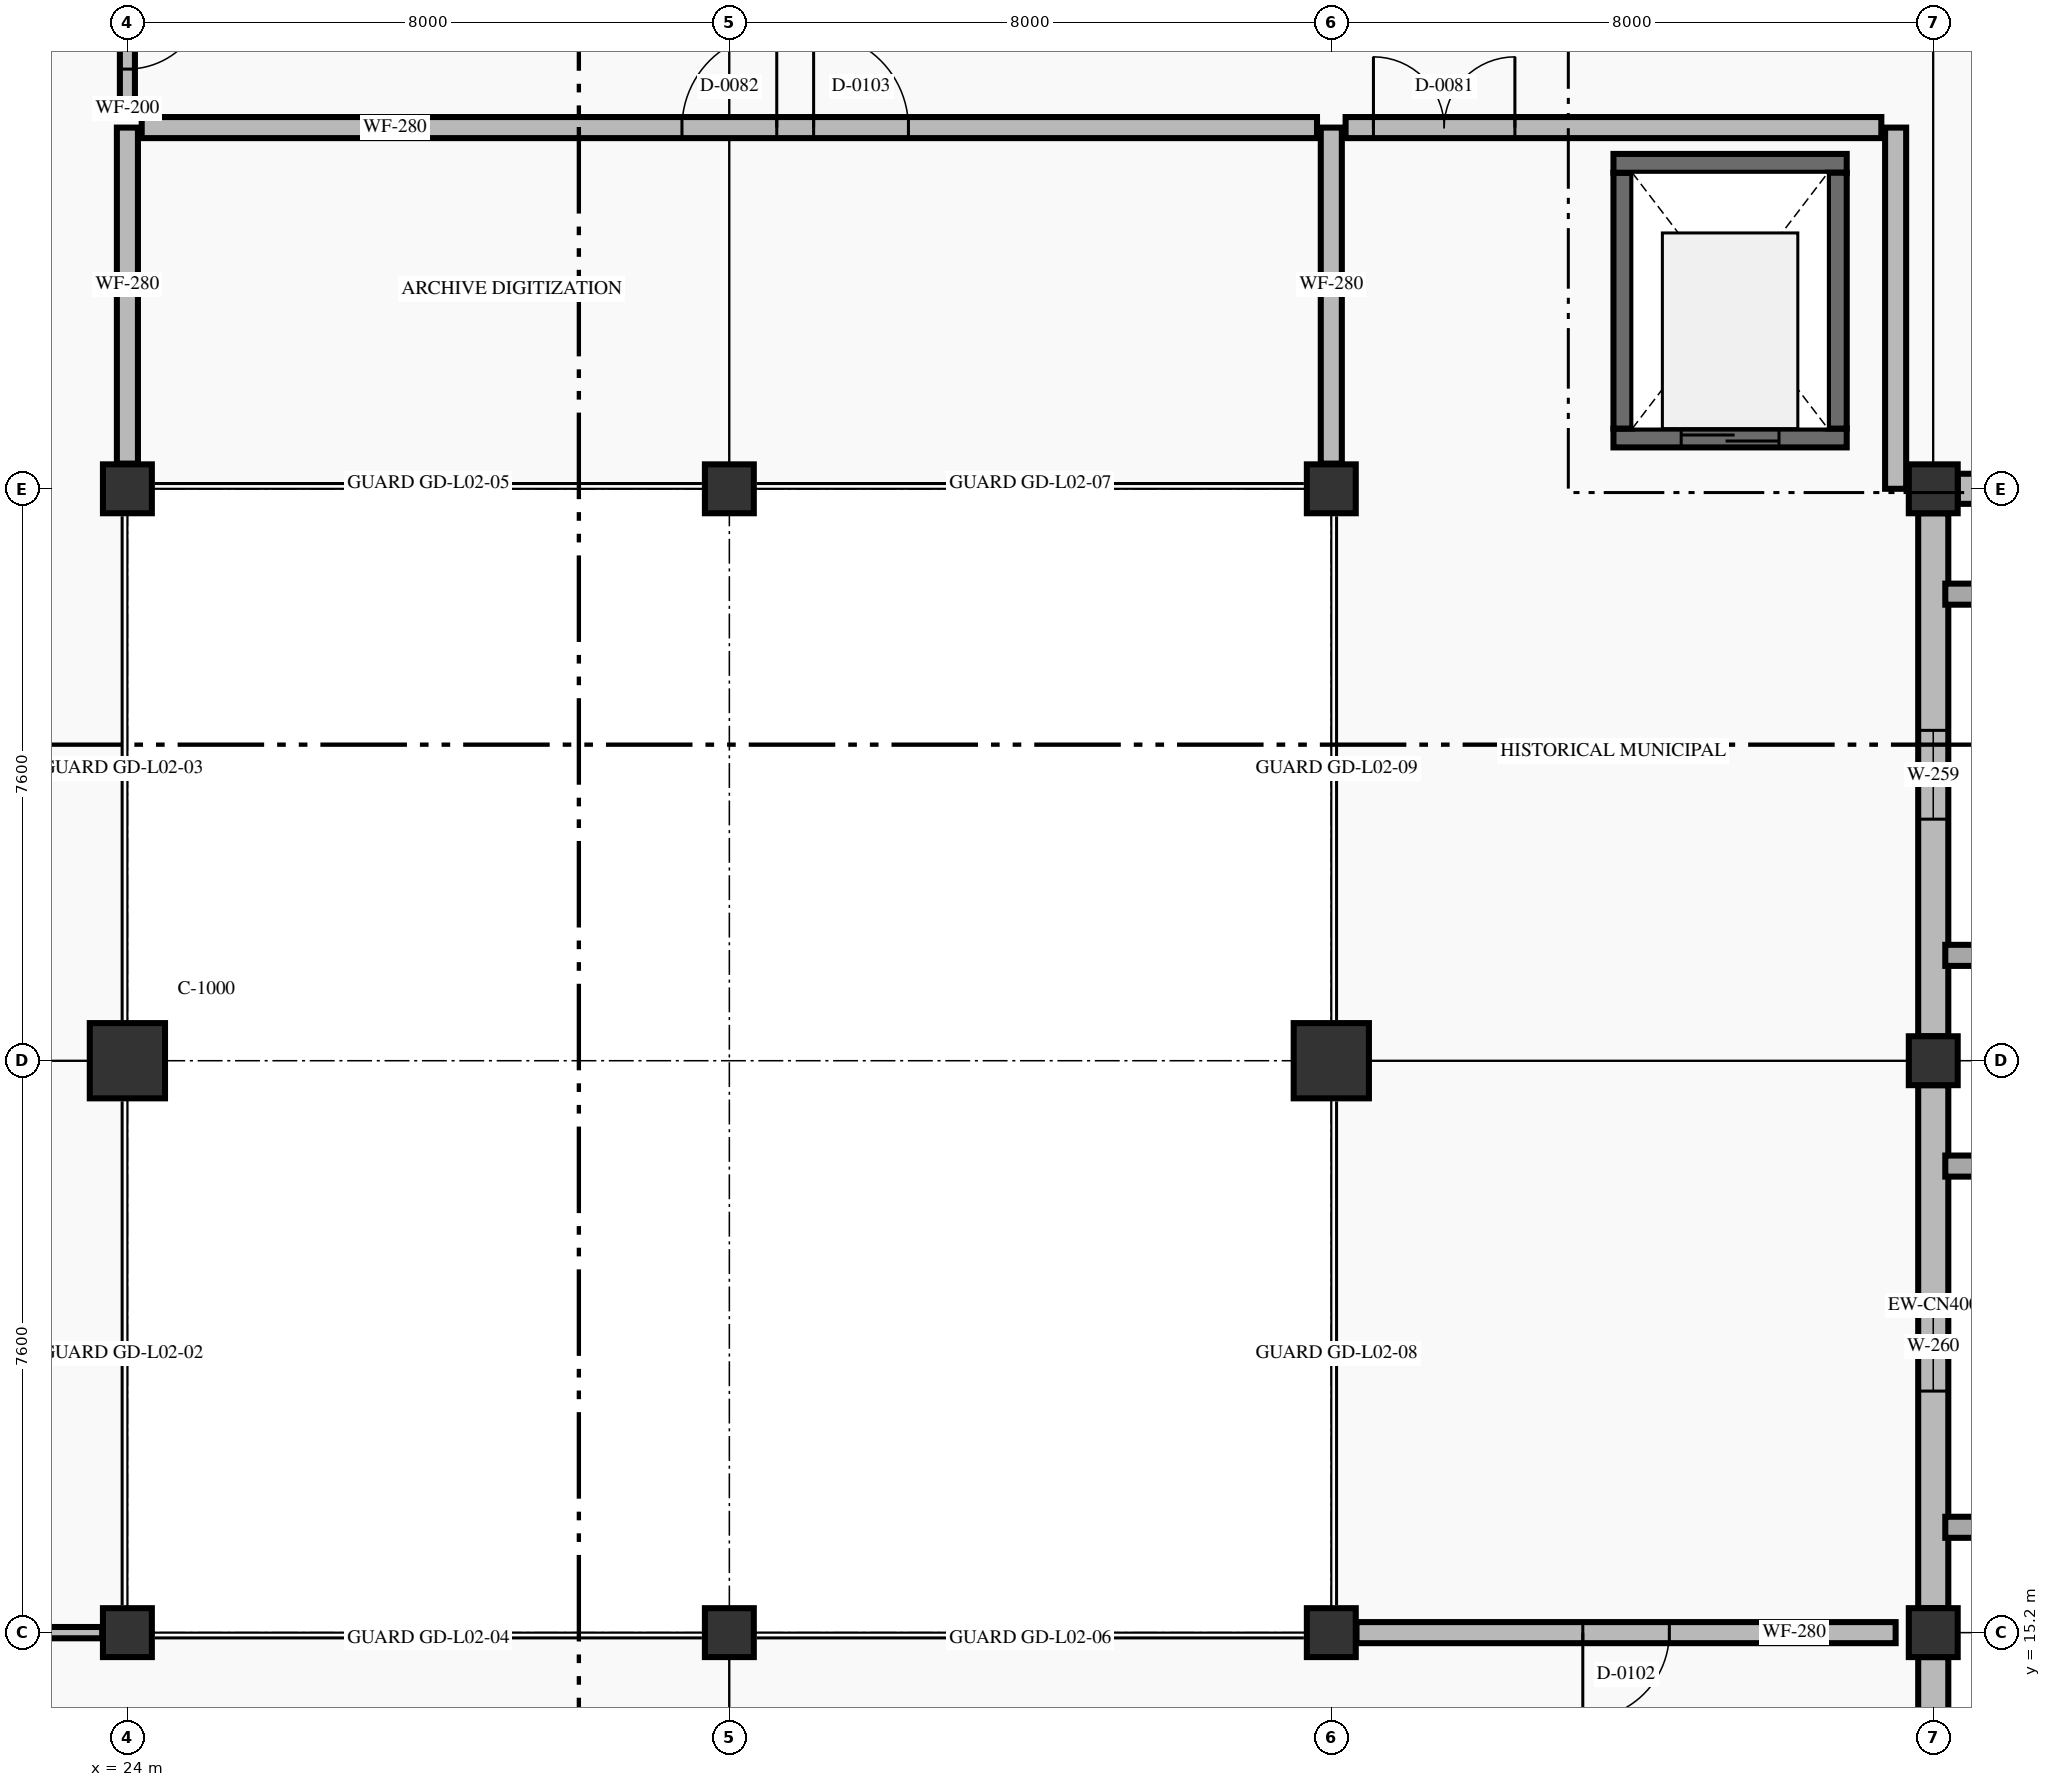
"""IFC4 building model, lengths in metres.
Left out: names, types, materials, properties, quantities, classifications, styles, units other than length and angle.
Written with IfcOpenShell. Run it as: python <this file> out.ifc"""

import sys

from ifc_helpers import new_model, si_unit, direction, frame, frame_2d, origin, origin_2d, place, context, subcontext, project, spatial, rectangle, extrude, element, fill, save


model = new_model("IFC4")
c1 = context("Model", 3, precision=1e-05, world=origin(), true_north=direction((0.0, 1.0)))
c2 = subcontext(c1, "Body", "Model", "MODEL_VIEW")
j1 = project(units=[si_unit("LENGTHUNIT", "METRE"), si_unit("PLANEANGLEUNIT", "RADIAN")], contexts=[c1])
p1 = place(None, origin())
s1 = spatial("IfcSite", under=j1, at=p1, CompositionType="ELEMENT")
p2 = place(p1, origin())
s2 = spatial("IfcBuilding", under=s1, at=p2, CompositionType="ELEMENT")
p3 = place(p2, frame((0.0, 0.0, 5.4)))
s3 = spatial("IfcBuildingStorey", under=s2, at=p3, CompositionType="ELEMENT", Elevation=5.4)
p4 = place(p3, frame((24.0, 15.2, 0.0), z_axis=(0.0, 0.0, 1.0), x_axis=(1.0, 0.0, 0.0)))
e1 = element("IfcColumn", 1, at=p4, inside=s3, PredefinedType="COLUMN", context=c2, shape_type="SweptSolid", body=[
    extrude(rectangle(XDim=0.65, YDim=0.65, at=origin_2d()), origin(), (0.0, 0.0, 1.0), 4.8),
])
p5 = place(p3, frame((24.0, 22.8, 0.0), z_axis=(0.0, 0.0, 1.0), x_axis=(1.0, 0.0, 0.0)))
e2 = element("IfcColumn", 2, at=p5, inside=s3, PredefinedType="COLUMN", context=c2, shape_type="SweptSolid", body=[
    extrude(rectangle(XDim=1.0, YDim=1.0, at=origin_2d()), origin(), (0.0, 0.0, 1.0), 4.8),
])
for number, where, z_axis, x_axis in (
    (3, (24.0, 30.4, 0.0), (0.0, 0.0, 1.0), (1.0, 0.0, 0.0)),
    (4, (32.0, 15.2, 0.0), (0.0, 0.0, 1.0), (1.0, 0.0, 0.0)),
    (5, (32.0, 30.4, 0.0), (0.0, 0.0, 1.0), (1.0, 0.0, 0.0)),
    (6, (40.0, 15.2, 0.0), (0.0, 0.0, 1.0), (1.0, 0.0, 0.0)),
):
    element("IfcColumn", number, at=place(p3, frame(where, z_axis=z_axis, x_axis=x_axis)), inside=s3, PredefinedType="COLUMN", context=c2, shape_type="SweptSolid", body=[
        extrude(rectangle(XDim=0.65, YDim=0.65, at=origin_2d()), origin(), (0.0, 0.0, 1.0), 4.8),
    ])
p6 = place(p3, frame((40.0, 22.8, 0.0), z_axis=(0.0, 0.0, 1.0), x_axis=(1.0, 0.0, 0.0)))
e7 = element("IfcColumn", 7, at=p6, inside=s3, PredefinedType="COLUMN", context=c2, shape_type="SweptSolid", body=[
    extrude(rectangle(XDim=1.0, YDim=1.0, at=origin_2d()), origin(), (0.0, 0.0, 1.0), 4.8),
])
for number, where, z_axis, x_axis in (
    (8, (40.0, 30.4, 0.0), (0.0, 0.0, 1.0), (1.0, 0.0, 0.0)),
    (9, (48.0, 15.2, 0.0), (0.0, 0.0, 1.0), (1.0, 0.0, 0.0)),
    (10, (48.0, 22.8, 0.0), (0.0, 0.0, 1.0), (1.0, 0.0, 0.0)),
    (11, (48.0, 30.4, 0.0), (0.0, 0.0, 1.0), (1.0, 0.0, 0.0)),
):
    element("IfcColumn", number, at=place(p3, frame(where, z_axis=z_axis, x_axis=x_axis)), inside=s3, PredefinedType="COLUMN", context=c2, shape_type="SweptSolid", body=[
        extrude(rectangle(XDim=0.65, YDim=0.65, at=origin_2d()), origin(), (0.0, 0.0, 1.0), 4.8),
    ])
p7 = place(p3, frame((55.6, 30.4, 0.0), z_axis=(0.0, 0.0, 1.0), x_axis=(-1.0, 0.0, 0.0)))
e12 = element("IfcWall", 12, at=p7, inside=s3, PredefinedType="STANDARD", context=c2, shape_type="SweptSolid", body=[
    extrude(rectangle(XDim=7.275, YDim=0.4, at=frame_2d((3.638, 0.0))), origin(), (0.0, 0.0, 1.0), 3.94),
])
p8 = place(p7, frame((1.019, 0.0, 0.9)))
e13 = element("IfcOpeningElement", 13, at=p8, cuts=e12, PredefinedType="OPENING", context=c2, shape_type="SweptSolid", body=[
    extrude(rectangle(XDim=1.6, YDim=2.25, at=frame_2d((0.8, 1.125))), frame((0.0, 0.21, 0.0), z_axis=(0.0, -1.0, 0.0), x_axis=(1.0, 0.0, 0.0)), (0.0, 0.0, 1.0), 0.42),
])
p9 = place(p7, frame((4.656, 0.0, 0.9)))
e14 = element("IfcOpeningElement", 14, at=p9, cuts=e12, PredefinedType="OPENING", context=c2, shape_type="SweptSolid", body=[
    extrude(rectangle(XDim=1.6, YDim=2.25, at=frame_2d((0.8, 1.125))), frame((0.0, 0.21, 0.0), z_axis=(0.0, -1.0, 0.0), x_axis=(1.0, 0.0, 0.0)), (0.0, 0.0, 1.0), 0.42),
])
p10 = place(p3, frame((48.0, 30.075, 0.0), z_axis=(0.0, 0.0, 1.0), x_axis=(0.0, -1.0, 0.0)))
e15 = element("IfcWall", 15, at=p10, inside=s3, PredefinedType="STANDARD", context=c2, shape_type="SweptSolid", body=[
    extrude(rectangle(XDim=6.95, YDim=0.4, at=frame_2d((3.475, 0.0))), origin(), (0.0, 0.0, 1.0), 3.84),
])
p11 = place(p10, frame((2.885, 0.0, 2.4)))
e16 = element("IfcOpeningElement", 16, at=p11, cuts=e15, PredefinedType="OPENING", context=c2, shape_type="SweptSolid", body=[
    extrude(rectangle(XDim=1.18, YDim=0.92, at=frame_2d((0.59, 0.46))), frame((0.0, 0.21, 0.0), z_axis=(0.0, -1.0, 0.0), x_axis=(1.0, 0.0, 0.0)), (0.0, 0.0, 1.0), 0.42),
])
p12 = place(p3, frame((48.0, 22.475, 0.0), z_axis=(0.0, 0.0, 1.0), x_axis=(0.0, -1.0, 0.0)))
e17 = element("IfcWall", 17, at=p12, inside=s3, PredefinedType="STANDARD", context=c2, shape_type="SweptSolid", body=[
    extrude(rectangle(XDim=6.95, YDim=0.4, at=frame_2d((3.475, 0.0))), origin(), (0.0, 0.0, 1.0), 3.84),
])
p13 = place(p12, frame((2.885, 0.0, 2.4)))
e18 = element("IfcOpeningElement", 18, at=p13, cuts=e17, PredefinedType="OPENING", context=c2, shape_type="SweptSolid", body=[
    extrude(rectangle(XDim=1.18, YDim=0.92, at=frame_2d((0.59, 0.46))), frame((0.0, 0.21, 0.0), z_axis=(0.0, -1.0, 0.0), x_axis=(1.0, 0.0, 0.0)), (0.0, 0.0, 1.0), 0.42),
])
p14 = place(p3, frame((48.0, 14.875, 0.0), z_axis=(0.0, 0.0, 1.0), x_axis=(0.0, -1.0, 0.0)))
e19 = element("IfcWall", 19, at=p14, inside=s3, PredefinedType="STANDARD", context=c2, shape_type="SweptSolid", body=[
    extrude(rectangle(XDim=6.95, YDim=0.4, at=frame_2d((3.475, 0.0))), origin(), (0.0, 0.0, 1.0), 3.84),
])
p15 = place(p14, frame((0.988, 0.0, 0.9)))
e20 = element("IfcOpeningElement", 20, at=p15, cuts=e19, PredefinedType="OPENING", context=c2, shape_type="SweptSolid", body=[
    extrude(rectangle(XDim=1.5, YDim=2.15, at=frame_2d((0.75, 1.075))), frame((0.0, 0.21, 0.0), z_axis=(0.0, -1.0, 0.0), x_axis=(1.0, 0.0, 0.0)), (0.0, 0.0, 1.0), 0.42),
])
p16 = place(p14, frame((4.462, 0.0, 0.9)))
e21 = element("IfcOpeningElement", 21, at=p16, cuts=e19, PredefinedType="OPENING", context=c2, shape_type="SweptSolid", body=[
    extrude(rectangle(XDim=1.5, YDim=2.15, at=frame_2d((0.75, 1.075))), frame((0.0, 0.21, 0.0), z_axis=(0.0, -1.0, 0.0), x_axis=(1.0, 0.0, 0.0)), (0.0, 0.0, 1.0), 0.42),
])
p17 = place(p3, frame((46.85, 31.075, 0.0), z_axis=(0.0, 0.0, 1.0), x_axis=(-1.0, 0.0, 0.0)))
e22 = element("IfcWall", 22, at=p17, inside=s3, PredefinedType="SHEAR", context=c2, shape_type="SweptSolid", body=[
    extrude(rectangle(XDim=3.1, YDim=0.25, at=frame_2d((1.55, 0.0))), origin(), (0.0, 0.0, 1.0), 4.8),
])
p18 = place(p17, frame((0.9, 0.0, 0.0)))
e23 = element("IfcOpeningElement", 23, at=p18, cuts=e22, PredefinedType="OPENING", context=c2, shape_type="SweptSolid", body=[
    extrude(rectangle(XDim=1.3, YDim=2.25, at=frame_2d((0.65, 1.125))), frame((0.0, 0.135, 0.0), z_axis=(0.0, -1.0, 0.0), x_axis=(1.0, 0.0, 0.0)), (0.0, 0.0, 1.0), 0.27),
])
p19 = place(p3, frame((43.875, 31.2, 0.0), z_axis=(0.0, 0.0, 1.0), x_axis=(0.0, 1.0, 0.0)))
e24 = element("IfcWall", 24, at=p19, inside=s3, PredefinedType="SHEAR", context=c2, shape_type="SweptSolid", body=[
    extrude(rectangle(XDim=3.4, YDim=0.25, at=frame_2d((1.7, 0.0))), origin(), (0.0, 0.0, 1.0), 4.8),
])
p20 = place(p3, frame((43.75, 34.725, 0.0), z_axis=(0.0, 0.0, 1.0), x_axis=(1.0, 0.0, 0.0)))
e25 = element("IfcWall", 25, at=p20, inside=s3, PredefinedType="SHEAR", context=c2, shape_type="SweptSolid", body=[
    extrude(rectangle(XDim=3.1, YDim=0.25, at=frame_2d((1.55, 0.0))), origin(), (0.0, 0.0, 1.0), 4.8),
])
p21 = place(p3, frame((46.725, 34.6, 0.0), z_axis=(0.0, 0.0, 1.0), x_axis=(0.0, -1.0, 0.0)))
e26 = element("IfcWall", 26, at=p21, inside=s3, PredefinedType="SHEAR", context=c2, shape_type="SweptSolid", body=[
    extrude(rectangle(XDim=3.4, YDim=0.25, at=frame_2d((1.7, 0.0))), origin(), (0.0, 0.0, 1.0), 4.8),
])
p22 = place(p3, frame((40.0, 30.735, 0.0), z_axis=(0.0, 0.0, 1.0), x_axis=(0.0, 1.0, 0.0)))
e27 = element("IfcWall", 27, at=p22, inside=s3, PredefinedType="STANDARD", context=c2, shape_type="SweptSolid", body=[
    extrude(rectangle(XDim=4.465, YDim=0.28, at=frame_2d((2.232, 0.0))), origin(), (0.0, 0.0, 1.0), 4.54),
])
p23 = place(p3, frame((47.5, 15.2, 0.0), z_axis=(0.0, 0.0, 1.0), x_axis=(-1.0, 0.0, 0.0)))
e28 = element("IfcWall", 28, at=p23, inside=s3, PredefinedType="STANDARD", context=c2, shape_type="SweptSolid", body=[
    extrude(rectangle(XDim=7.165, YDim=0.28, at=frame_2d((3.583, 0.0))), origin(), (0.0, 0.0, 1.0), 3.89),
])
p24 = place(p23, frame((3.008, 0.0, 0.0)))
e29 = element("IfcOpeningElement", 29, at=p24, cuts=e28, PredefinedType="OPENING", context=c2, shape_type="SweptSolid", body=[
    extrude(rectangle(XDim=1.15, YDim=2.2, at=frame_2d((0.575, 1.1))), frame((0.0, 0.15, 0.0), z_axis=(0.0, -1.0, 0.0), x_axis=(1.0, 0.0, 0.0)), (0.0, 0.0, 1.0), 0.3),
])
p25 = place(p3, frame((47.5, 35.2, 0.0), z_axis=(0.0, 0.0, 1.0), x_axis=(0.0, -1.0, 0.0)))
e30 = element("IfcWall", 30, at=p25, inside=s3, PredefinedType="STANDARD", context=c2, shape_type="SweptSolid", body=[
    extrude(rectangle(XDim=4.8, YDim=0.28, at=frame_2d((2.4, 0.0))), origin(), (0.0, 0.0, 1.0), 4.54),
])
p26 = place(p3, frame((40.19, 35.2, 0.0), z_axis=(0.0, 0.0, 1.0), x_axis=(1.0, 0.0, 0.0)))
e31 = element("IfcWall", 31, at=p26, inside=s3, PredefinedType="STANDARD", context=c2, shape_type="SweptSolid", body=[
    extrude(rectangle(XDim=7.12, YDim=0.28, at=frame_2d((3.56, 0.0))), origin(), (0.0, 0.0, 1.0), 4.54),
])
p27 = place(p26, frame((0.37, 0.0, 0.0)))
e32 = element("IfcOpeningElement", 32, at=p27, cuts=e31, PredefinedType="OPENING", context=c2, shape_type="SweptSolid", body=[
    extrude(rectangle(XDim=1.88, YDim=2.36, at=frame_2d((0.94, 1.18))), frame((0.0, 0.15, 0.0), z_axis=(0.0, -1.0, 0.0), x_axis=(1.0, 0.0, 0.0)), (0.0, 0.0, 1.0), 0.3),
])
p28 = place(p3, frame((24.0, 30.735, 0.0), z_axis=(0.0, 0.0, 1.0), x_axis=(0.0, 1.0, 0.0)))
e33 = element("IfcWall", 33, at=p28, inside=s3, PredefinedType="STANDARD", context=c2, shape_type="SweptSolid", body=[
    extrude(rectangle(XDim=4.465, YDim=0.28, at=frame_2d((2.232, 0.0))), origin(), (0.0, 0.0, 1.0), 4.54),
])
p29 = place(p3, frame((24.19, 35.2, 0.0), z_axis=(0.0, 0.0, 1.0), x_axis=(1.0, 0.0, 0.0)))
e34 = element("IfcWall", 34, at=p29, inside=s3, PredefinedType="STANDARD", context=c2, shape_type="SweptSolid", body=[
    extrude(rectangle(XDim=15.62, YDim=0.28, at=frame_2d((7.81, 0.0))), origin(), (0.0, 0.0, 1.0), 4.54),
])
p30 = place(p29, frame((7.18, 0.0, 0.0)))
e35 = element("IfcOpeningElement", 35, at=p30, cuts=e34, PredefinedType="OPENING", context=c2, shape_type="SweptSolid", body=[
    extrude(rectangle(XDim=1.26, YDim=2.26, at=frame_2d((0.63, 1.13))), frame((0.0, 0.15, 0.0), z_axis=(0.0, -1.0, 0.0), x_axis=(1.0, 0.0, 0.0)), (0.0, 0.0, 1.0), 0.3),
])
p31 = place(p29, frame((8.93, 0.0, 0.0)))
e36 = element("IfcOpeningElement", 36, at=p31, cuts=e34, PredefinedType="OPENING", context=c2, shape_type="SweptSolid", body=[
    extrude(rectangle(XDim=1.26, YDim=2.26, at=frame_2d((0.63, 1.13))), frame((0.0, 0.15, 0.0), z_axis=(0.0, -1.0, 0.0), x_axis=(1.0, 0.0, 0.0)), (0.0, 0.0, 1.0), 0.3),
])
p32 = place(p3, frame((23.665, 15.2, 0.0), z_axis=(0.0, 0.0, 1.0), x_axis=(-1.0, 0.0, 0.0)))
e37 = element("IfcWall", 37, at=p32, inside=s3, PredefinedType="PARTITIONING", context=c2, shape_type="SweptSolid", body=[
    extrude(rectangle(XDim=7.33, YDim=0.15, at=frame_2d((3.665, 0.0))), origin(), (0.0, 0.0, 1.0), 3.89),
])
p33 = place(p3, frame((24.0, 37.615, 0.0), z_axis=(0.0, 0.0, 1.0), x_axis=(0.0, -1.0, 0.0)))
e38 = element("IfcWall", 38, at=p33, inside=s3, PredefinedType="STANDARD", context=c2, shape_type="SweptSolid", body=[
    extrude(rectangle(XDim=2.225, YDim=0.2, at=frame_2d((1.113, 0.0))), origin(), (0.0, 0.0, 1.0), 4.54),
])
p34 = place(p33, frame((0.587, 0.0, 0.0)))
e39 = element("IfcOpeningElement", 39, at=p34, cuts=e38, PredefinedType="OPENING", context=c2, shape_type="SweptSolid", body=[
    extrude(rectangle(XDim=1.05, YDim=2.15, at=frame_2d((0.525, 1.075))), frame((0.0, 0.11, 0.0), z_axis=(0.0, -1.0, 0.0), x_axis=(1.0, 0.0, 0.0)), (0.0, 0.0, 1.0), 0.22),
])
p35 = place(p11, origin())
e40 = element("IfcWindow", 40, at=p35, inside=s3, PartitioningType="SINGLE_PANEL", PredefinedType="WINDOW", context=c2, shape_type="SweptSolid", body=[
    extrude(rectangle(XDim=1.18, YDim=0.92, at=frame_2d((0.59, 0.46))), frame((0.0, 0.03, 0.0), z_axis=(0.0, -1.0, 0.0), x_axis=(1.0, 0.0, 0.0)), (0.0, 0.0, 1.0), 0.06),
])
fill(e16, e40)
p36 = place(p13, origin())
e41 = element("IfcWindow", 41, at=p36, inside=s3, PartitioningType="SINGLE_PANEL", PredefinedType="WINDOW", context=c2, shape_type="SweptSolid", body=[
    extrude(rectangle(XDim=1.18, YDim=0.92, at=frame_2d((0.59, 0.46))), frame((0.0, 0.03, 0.0), z_axis=(0.0, -1.0, 0.0), x_axis=(1.0, 0.0, 0.0)), (0.0, 0.0, 1.0), 0.06),
])
fill(e18, e41)
p37 = place(p18, origin())
e42 = element("IfcDoor", 42, at=p37, inside=s3, OperationType="DOUBLE_DOOR_SLIDING", PredefinedType="DOOR", context=c2, shape_type="SweptSolid", body=[
    extrude(rectangle(XDim=1.3, YDim=2.25, at=frame_2d((0.65, 1.125))), frame((0.0, 0.025, 0.0), z_axis=(0.0, -1.0, 0.0), x_axis=(1.0, 0.0, 0.0)), (0.0, 0.0, 1.0), 0.05),
])
fill(e23, e42)
p38 = place(p27, origin())
e43 = element("IfcDoor", 43, at=p38, inside=s3, OperationType="DOUBLE_DOOR_SINGLE_SWING", PredefinedType="DOOR", context=c2, shape_type="SweptSolid", body=[
    extrude(rectangle(XDim=1.88, YDim=2.36, at=frame_2d((0.94, 1.18))), frame((0.0, 0.025, 0.0), z_axis=(0.0, -1.0, 0.0), x_axis=(1.0, 0.0, 0.0)), (0.0, 0.0, 1.0), 0.05),
])
fill(e32, e43)
p39 = place(p30, origin())
e44 = element("IfcDoor", 44, at=p39, inside=s3, OperationType="SINGLE_SWING_RIGHT", PredefinedType="DOOR", context=c2, shape_type="SweptSolid", body=[
    extrude(rectangle(XDim=1.26, YDim=2.26, at=frame_2d((0.63, 1.13))), frame((0.0, 0.025, 0.0), z_axis=(0.0, -1.0, 0.0), x_axis=(1.0, 0.0, 0.0)), (0.0, 0.0, 1.0), 0.05),
])
fill(e35, e44)
p40 = place(p34, origin())
e45 = element("IfcDoor", 45, at=p40, inside=s3, OperationType="SINGLE_SWING_LEFT", PredefinedType="DOOR", context=c2, shape_type="SweptSolid", body=[
    extrude(rectangle(XDim=1.05, YDim=2.15, at=frame_2d((0.525, 1.075))), frame((0.0, 0.025, 0.0), z_axis=(0.0, -1.0, 0.0), x_axis=(1.0, 0.0, 0.0)), (0.0, 0.0, 1.0), 0.05),
])
fill(e39, e45)
p41 = place(p24, origin())
e46 = element("IfcDoor", 46, at=p41, inside=s3, OperationType="SINGLE_SWING_RIGHT", PredefinedType="DOOR", context=c2, shape_type="SweptSolid", body=[
    extrude(rectangle(XDim=1.15, YDim=2.2, at=frame_2d((0.575, 1.1))), frame((0.0, 0.025, 0.0), z_axis=(0.0, -1.0, 0.0), x_axis=(1.0, 0.0, 0.0)), (0.0, 0.0, 1.0), 0.05),
])
fill(e29, e46)
p42 = place(p31, origin())
e47 = element("IfcDoor", 47, at=p42, inside=s3, OperationType="SINGLE_SWING_LEFT", PredefinedType="DOOR", context=c2, shape_type="SweptSolid", body=[
    extrude(rectangle(XDim=1.26, YDim=2.26, at=frame_2d((0.63, 1.13))), frame((0.0, 0.025, 0.0), z_axis=(0.0, -1.0, 0.0), x_axis=(1.0, 0.0, 0.0)), (0.0, 0.0, 1.0), 0.05),
])
fill(e36, e47)
save(model, sys.argv[1])
